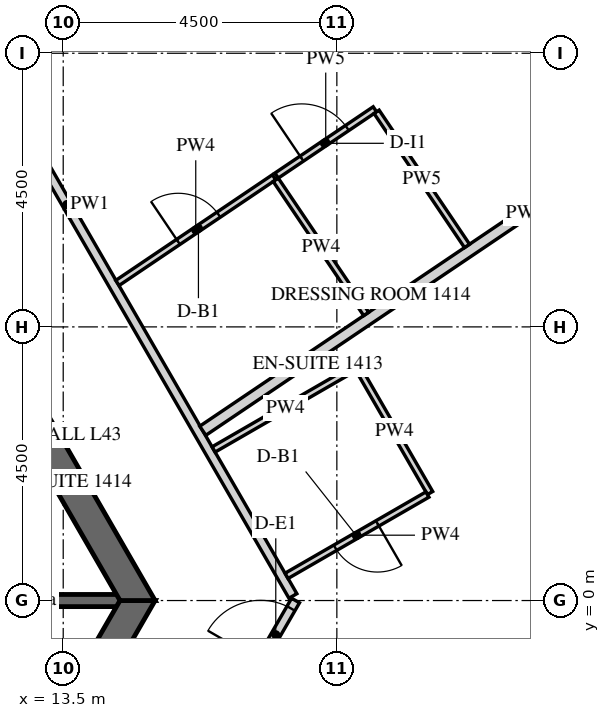
"""IFC4 building model, lengths in metres.
Left out: names, types, materials, properties, quantities, classifications, styles, units other than length and angle.
Written with IfcOpenShell. Run it as: python <this file> out.ifc"""

import sys

from ifc_helpers import new_model, si_unit, direction, frame, frame_2d, origin, place, context, subcontext, project, spatial, polyline, rectangle, outline, extrude, element, fill, save


model = new_model("IFC4")
c1 = context("Model", 3, precision=1e-05, world=origin(), true_north=direction((0.0, 1.0)))
c2 = subcontext(c1, "Body", "Model", "MODEL_VIEW")
j1 = project(units=[si_unit("LENGTHUNIT", "METRE"), si_unit("PLANEANGLEUNIT", "RADIAN")], contexts=[c1])
p1 = place(None, origin())
s1 = spatial("IfcSite", under=j1, at=p1, CompositionType="ELEMENT")
p2 = place(p1, origin())
s2 = spatial("IfcBuilding", under=s1, at=p2, CompositionType="ELEMENT")
p3 = place(p2, frame((0.0, 0.0, 183.9)))
s3 = spatial("IfcBuildingStorey", under=s2, at=p3, CompositionType="ELEMENT", Elevation=183.9)
p4 = place(p3, frame((31.371, 3.071, -0.15), z_axis=(0.0, 0.0, 1.0), x_axis=(-0.559189891278, 0.829039604297, 0.0)))
e1 = element("IfcWall", 1, at=p4, inside=s3, PredefinedType="SOLIDWALL", context=c2, shape_type="SweptSolid", body=[
    extrude(outline(polyline([(-0.026, -0.275), (27.781, -0.275), (27.736, 0.275), (0.026, 0.275), (-0.026, -0.275)])), origin(), (0.0, 0.0, 1.0), 3.9),
])
p5 = place(p4, frame((1.879, 0.0, 1.05)))
e2 = element("IfcOpeningElement", 2, at=p5, cuts=e1, PredefinedType="OPENING", context=c2, shape_type="SweptSolid", body=[
    extrude(rectangle(XDim=2.4, YDim=2.4, at=frame_2d((1.2, 1.2))), frame((0.0, 0.285, 0.0), z_axis=(0.0, -1.0, 0.0), x_axis=(1.0, 0.0, 0.0)), (0.0, 0.0, 1.0), 0.57),
])
p6 = place(p4, frame((5.479, 0.0, 1.05)))
e3 = element("IfcOpeningElement", 3, at=p6, cuts=e1, PredefinedType="OPENING", context=c2, shape_type="SweptSolid", body=[
    extrude(rectangle(XDim=2.4, YDim=2.4, at=frame_2d((1.2, 1.2))), frame((0.0, 0.285, 0.0), z_axis=(0.0, -1.0, 0.0), x_axis=(1.0, 0.0, 0.0)), (0.0, 0.0, 1.0), 0.57),
])
p7 = place(p4, frame((9.079, 0.0, 1.05)))
e4 = element("IfcOpeningElement", 4, at=p7, cuts=e1, PredefinedType="OPENING", context=c2, shape_type="SweptSolid", body=[
    extrude(rectangle(XDim=2.4, YDim=2.4, at=frame_2d((1.2, 1.2))), frame((0.0, 0.285, 0.0), z_axis=(0.0, -1.0, 0.0), x_axis=(1.0, 0.0, 0.0)), (0.0, 0.0, 1.0), 0.57),
])
p8 = place(p4, frame((12.679, 0.0, 1.05)))
e5 = element("IfcOpeningElement", 5, at=p8, cuts=e1, PredefinedType="OPENING", context=c2, shape_type="SweptSolid", body=[
    extrude(rectangle(XDim=2.4, YDim=2.4, at=frame_2d((1.2, 1.2))), frame((0.0, 0.285, 0.0), z_axis=(0.0, -1.0, 0.0), x_axis=(1.0, 0.0, 0.0)), (0.0, 0.0, 1.0), 0.57),
])
p9 = place(p4, frame((16.279, 0.0, 1.05)))
e6 = element("IfcOpeningElement", 6, at=p9, cuts=e1, PredefinedType="OPENING", context=c2, shape_type="SweptSolid", body=[
    extrude(rectangle(XDim=2.4, YDim=2.4, at=frame_2d((1.2, 1.2))), frame((0.0, 0.285, 0.0), z_axis=(0.0, -1.0, 0.0), x_axis=(1.0, 0.0, 0.0)), (0.0, 0.0, 1.0), 0.57),
])
p10 = place(p4, frame((19.879, 0.0, 1.05)))
e7 = element("IfcOpeningElement", 7, at=p10, cuts=e1, PredefinedType="OPENING", context=c2, shape_type="SweptSolid", body=[
    extrude(rectangle(XDim=2.4, YDim=2.4, at=frame_2d((1.2, 1.2))), frame((0.0, 0.285, 0.0), z_axis=(0.0, -1.0, 0.0), x_axis=(1.0, 0.0, 0.0)), (0.0, 0.0, 1.0), 0.57),
])
p11 = place(p4, frame((23.479, 0.0, 1.05)))
e8 = element("IfcOpeningElement", 8, at=p11, cuts=e1, PredefinedType="OPENING", context=c2, shape_type="SweptSolid", body=[
    extrude(rectangle(XDim=2.4, YDim=2.4, at=frame_2d((1.2, 1.2))), frame((0.0, 0.285, 0.0), z_axis=(0.0, -1.0, 0.0), x_axis=(1.0, 0.0, 0.0)), (0.0, 0.0, 1.0), 0.57),
])
p12 = place(p3, frame((7.361, -12.75, -0.15), z_axis=(0.0, 0.0, 1.0), x_axis=(0.50000571537, 0.866022103989, 0.0)))
e9 = element("IfcWall", 9, at=p12, inside=s3, PredefinedType="SHEAR", context=c2, shape_type="SweptSolid", body=[
    extrude(outline(polyline([(-0.144, -0.25), (14.867, -0.25), (14.578, 0.25), (0.144, 0.25), (-0.144, -0.25)])), origin(), (0.0, 0.0, 1.0), 3.9),
])
p13 = place(p12, frame((6.49, 0.0, 0.15)))
e10 = element("IfcOpeningElement", 10, at=p13, cuts=e9, PredefinedType="OPENING", context=c2, shape_type="SweptSolid", body=[
    extrude(rectangle(XDim=1.8, YDim=2.4, at=frame_2d((0.9, 1.2))), frame((0.0, 0.26, 0.0), z_axis=(0.0, -1.0, 0.0), x_axis=(1.0, 0.0, 0.0)), (0.0, 0.0, 1.0), 0.52),
])
p14 = place(p3, frame((14.722, 0.0, -0.15), z_axis=(0.0, 0.0, 1.0), x_axis=(-0.50000571537, 0.866022103989, 0.0)))
e11 = element("IfcWall", 11, at=p14, inside=s3, PredefinedType="SHEAR", context=c2, shape_type="SweptSolid", body=[
    extrude(outline(polyline([(-0.144, -0.25), (14.867, -0.25), (14.578, 0.25), (0.144, 0.25), (-0.144, -0.25)])), origin(), (0.0, 0.0, 1.0), 3.9),
])
p15 = place(p14, frame((6.432, 0.0, 0.15)))
e12 = element("IfcOpeningElement", 12, at=p15, cuts=e11, PredefinedType="OPENING", context=c2, shape_type="SweptSolid", body=[
    extrude(rectangle(XDim=1.8, YDim=2.4, at=frame_2d((0.9, 1.2))), frame((0.0, 0.26, 0.0), z_axis=(0.0, -1.0, 0.0), x_axis=(1.0, 0.0, 0.0)), (0.0, 0.0, 1.0), 0.52),
])
p16 = place(p3, frame((11.547, 0.0, -0.15), z_axis=(0.0, 0.0, 1.0), x_axis=(1.0, 0.0, 0.0)))
e13 = element("IfcWall", 13, at=p16, inside=s3, PredefinedType="SHEAR", context=c2, shape_type="SweptSolid", body=[
    extrude(rectangle(XDim=2.887, YDim=0.2, at=frame_2d((1.443, 0.0))), origin(), (0.0, 0.0, 1.0), 3.9),
])
p17 = place(p3, frame((9.887, -12.875, 0.0), z_axis=(0.0, 0.0, 1.0), x_axis=(0.499998228944, 0.866026426302, 0.0)))
e14 = element("IfcWall", 14, at=p17, inside=s3, PredefinedType="PARTITIONING", context=c2, shape_type="SweptSolid", body=[
    extrude(rectangle(XDim=14.867, YDim=0.15, at=frame_2d((7.433, 0.0))), origin(), (0.0, 0.0, 1.0), 2.988),
])
p18 = place(p17, frame((8.224, 0.0, 0.0)))
e15 = element("IfcOpeningElement", 15, at=p18, cuts=e14, PredefinedType="OPENING", context=c2, shape_type="SweptSolid", body=[
    extrude(rectangle(XDim=1.0, YDim=2.1, at=frame_2d((0.5, 1.05))), frame((0.0, 0.085, 0.0), z_axis=(0.0, -1.0, 0.0), x_axis=(1.0, 0.0, 0.0)), (0.0, 0.0, 1.0), 0.17),
])
p19 = place(p17, frame((13.717, 0.0, 0.0)))
e16 = element("IfcOpeningElement", 16, at=p19, cuts=e14, PredefinedType="OPENING", context=c2, shape_type="SweptSolid", body=[
    extrude(rectangle(XDim=1.0, YDim=2.1, at=frame_2d((0.5, 1.05))), frame((0.0, 0.085, 0.0), z_axis=(0.0, -1.0, 0.0), x_axis=(1.0, 0.0, 0.0)), (0.0, 0.0, 1.0), 0.17),
])
p20 = place(p3, frame((17.277, 0.075, 0.0), z_axis=(0.0, 0.0, 1.0), x_axis=(-0.499998228944, 0.866026426302, 0.0)))
e17 = element("IfcWall", 17, at=p20, inside=s3, PredefinedType="PARTITIONING", context=c2, shape_type="SweptSolid", body=[
    extrude(rectangle(XDim=14.867, YDim=0.15, at=frame_2d((7.433, 0.0))), origin(), (0.0, 0.0, 1.0), 2.988),
])
p21 = place(p20, frame((9.398, 0.0, 0.0)))
e18 = element("IfcOpeningElement", 18, at=p21, cuts=e17, PredefinedType="OPENING", context=c2, shape_type="SweptSolid", body=[
    extrude(rectangle(XDim=1.0, YDim=2.1, at=frame_2d((0.5, 1.05))), frame((0.0, 0.085, 0.0), z_axis=(0.0, -1.0, 0.0), x_axis=(1.0, 0.0, 0.0)), (0.0, 0.0, 1.0), 0.17),
])
p22 = place(p3, frame((15.973, 2.484, 0.0), z_axis=(0.0, 0.0, 1.0), x_axis=(0.866051307416, 0.49995513091, 0.0)))
e19 = element("IfcWall", 19, at=p22, inside=s3, PredefinedType="PARTITIONING", context=c2, shape_type="SweptSolid", body=[
    extrude(rectangle(XDim=2.725, YDim=0.1, at=frame_2d((1.362, 0.0))), origin(), (0.0, 0.0, 1.0), 2.988),
])
p23 = place(p3, frame((18.358, 3.803, 0.0), z_axis=(0.0, 0.0, 1.0), x_axis=(0.500016218704, -0.866016039709, 0.0)))
e20 = element("IfcWall", 20, at=p23, inside=s3, PredefinedType="PARTITIONING", context=c2, shape_type="SweptSolid", body=[
    extrude(rectangle(XDim=2.35, YDim=0.1, at=frame_2d((1.175, 0.0))), origin(), (0.0, 0.0, 1.0), 2.988),
])
p24 = place(p3, frame((19.49, 1.743, 0.0), z_axis=(0.0, 0.0, 1.0), x_axis=(-0.866004723184, -0.50003581814, 0.0)))
e21 = element("IfcWall", 21, at=p24, inside=s3, PredefinedType="PARTITIONING", context=c2, shape_type="SweptSolid", body=[
    extrude(rectangle(XDim=2.675, YDim=0.1, at=frame_2d((1.337, 0.0))), origin(), (0.0, 0.0, 1.0), 2.988),
])
p25 = place(p24, frame((0.95, 0.0, 0.0)))
e22 = element("IfcOpeningElement", 22, at=p25, cuts=e21, PredefinedType="OPENING", context=c2, shape_type="SweptSolid", body=[
    extrude(rectangle(XDim=0.8, YDim=2.1, at=frame_2d((0.4, 1.05))), frame((0.0, 0.06, 0.0), z_axis=(0.0, -1.0, 0.0), x_axis=(1.0, 0.0, 0.0)), (0.0, 0.0, 1.0), 0.12),
])
p26 = place(p3, frame((26.402, 9.946, 0.0), z_axis=(0.0, 0.0, 1.0), x_axis=(-0.829037771727, -0.559192608187, 0.0)))
e23 = element("IfcWall", 23, at=p26, inside=s3, PredefinedType="PARTITIONING", context=c2, shape_type="SweptSolid", body=[
    extrude(rectangle(XDim=12.794, YDim=0.18, at=frame_2d((6.397, 0.0))), origin(), (0.0, 0.0, 1.0), 2.988),
])
p27 = place(p3, frame((14.392, 5.223, 0.0), z_axis=(0.0, 0.0, 1.0), x_axis=(0.829015360708, 0.559225832477, 0.0)))
e24 = element("IfcWall", 24, at=p27, inside=s3, PredefinedType="PARTITIONING", context=c2, shape_type="SweptSolid", body=[
    extrude(rectangle(XDim=3.107, YDim=0.1, at=frame_2d((1.553, 0.0))), origin(), (0.0, 0.0, 1.0), 2.988),
])
p28 = place(p27, frame((1.207, 0.0, 0.0)))
e25 = element("IfcOpeningElement", 25, at=p28, cuts=e24, PredefinedType="OPENING", context=c2, shape_type="SweptSolid", body=[
    extrude(rectangle(XDim=0.8, YDim=2.1, at=frame_2d((0.4, 1.05))), frame((0.0, 0.06, 0.0), z_axis=(0.0, -1.0, 0.0), x_axis=(1.0, 0.0, 0.0)), (0.0, 0.0, 1.0), 0.12),
])
p29 = place(p3, frame((17.009, 6.988, 0.0), z_axis=(0.0, 0.0, 1.0), x_axis=(0.828974932022, 0.559285760662, 0.0)))
e26 = element("IfcWall", 26, at=p29, inside=s3, PredefinedType="PARTITIONING", context=c2, shape_type="SweptSolid", body=[
    extrude(rectangle(XDim=1.95, YDim=0.1, at=frame_2d((0.975, 0.0))), origin(), (0.0, 0.0, 1.0), 2.988),
])
p30 = place(p29, frame((0.5, 0.0, 0.0)))
e27 = element("IfcOpeningElement", 27, at=p30, cuts=e26, PredefinedType="OPENING", context=c2, shape_type="SweptSolid", body=[
    extrude(rectangle(XDim=0.9, YDim=2.1, at=frame_2d((0.45, 1.05))), frame((0.0, 0.06, 0.0), z_axis=(0.0, -1.0, 0.0), x_axis=(1.0, 0.0, 0.0)), (0.0, 0.0, 1.0), 0.12),
])
p31 = place(p3, frame((18.653, 8.037, 0.0), z_axis=(0.0, 0.0, 1.0), x_axis=(0.559203284223, -0.829030570555, 0.0)))
e28 = element("IfcWall", 28, at=p31, inside=s3, PredefinedType="PARTITIONING", context=c2, shape_type="SweptSolid", body=[
    extrude(rectangle(XDim=2.66, YDim=0.1, at=frame_2d((1.33, 0.0))), origin(), (0.0, 0.0, 1.0), 2.988),
])
p32 = place(p3, frame((18.483, 4.713, 0.0), z_axis=(0.0, 0.0, 1.0), x_axis=(-0.559140201119, 0.829073118303, 0.0)))
e29 = element("IfcWall", 29, at=p32, inside=s3, PredefinedType="PARTITIONING", context=c2, shape_type="SweptSolid", body=[
    extrude(rectangle(XDim=2.66, YDim=0.1, at=frame_2d((1.33, 0.0))), origin(), (0.0, 0.0, 1.0), 2.988),
])
p33 = place(p19, origin())
e30 = element("IfcDoor", 30, at=p33, inside=s3, OperationType="SINGLE_SWING_LEFT", PredefinedType="DOOR", context=c2, shape_type="SweptSolid", body=[
    extrude(rectangle(XDim=1.0, YDim=2.1, at=frame_2d((0.5, 1.05))), frame((0.0, 0.025, 0.0), z_axis=(0.0, -1.0, 0.0), x_axis=(1.0, 0.0, 0.0)), (0.0, 0.0, 1.0), 0.05),
])
fill(e16, e30)
p34 = place(p25, origin())
e31 = element("IfcDoor", 31, at=p34, inside=s3, OperationType="SINGLE_SWING_RIGHT", PredefinedType="DOOR", context=c2, shape_type="SweptSolid", body=[
    extrude(rectangle(XDim=0.8, YDim=2.1, at=frame_2d((0.4, 1.05))), frame((0.0, 0.025, 0.0), z_axis=(0.0, -1.0, 0.0), x_axis=(1.0, 0.0, 0.0)), (0.0, 0.0, 1.0), 0.05),
])
fill(e22, e31)
p35 = place(p28, origin())
e32 = element("IfcDoor", 32, at=p35, inside=s3, OperationType="SINGLE_SWING_LEFT", PredefinedType="DOOR", context=c2, shape_type="SweptSolid", body=[
    extrude(rectangle(XDim=0.8, YDim=2.1, at=frame_2d((0.4, 1.05))), frame((0.0, 0.025, 0.0), z_axis=(0.0, -1.0, 0.0), x_axis=(1.0, 0.0, 0.0)), (0.0, 0.0, 1.0), 0.05),
])
fill(e25, e32)
p36 = place(p30, origin())
e33 = element("IfcDoor", 33, at=p36, inside=s3, OperationType="SINGLE_SWING_RIGHT", PredefinedType="DOOR", context=c2, shape_type="SweptSolid", body=[
    extrude(rectangle(XDim=0.9, YDim=2.1, at=frame_2d((0.45, 1.05))), frame((0.0, 0.025, 0.0), z_axis=(0.0, -1.0, 0.0), x_axis=(1.0, 0.0, 0.0)), (0.0, 0.0, 1.0), 0.05),
])
fill(e27, e33)
save(model, sys.argv[1])
